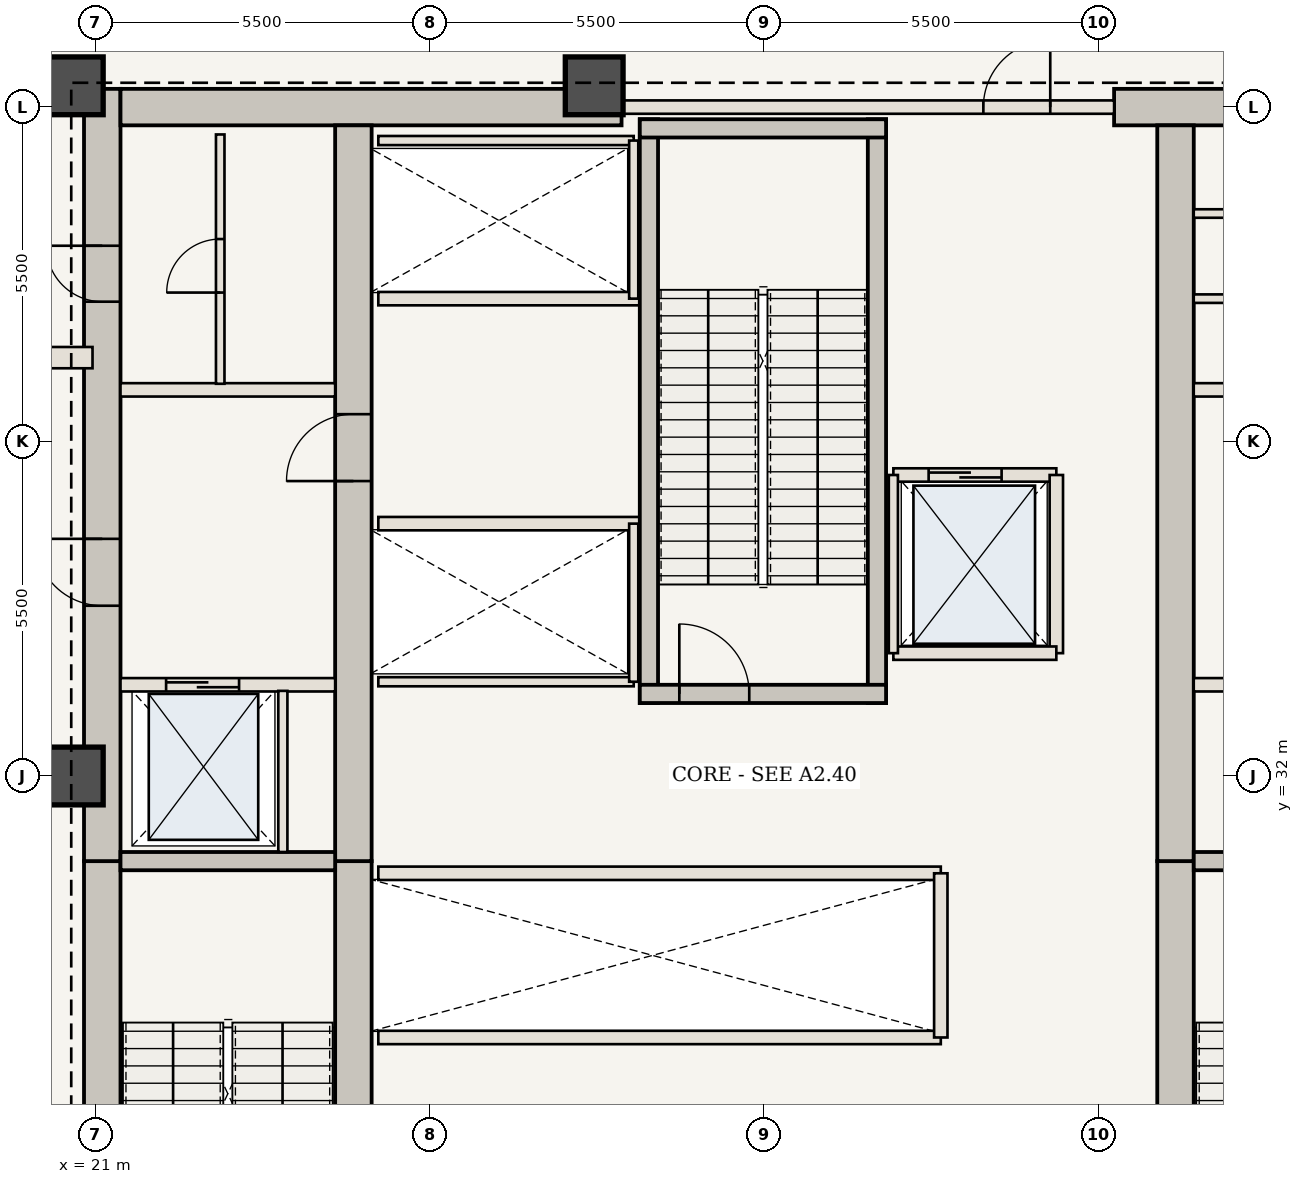
"""IFC4 building model, lengths in metres.
Left out: names, types, materials, properties, quantities, classifications, styles, units other than length and angle.
Written with IfcOpenShell. Run it as: python <this file> out.ifc"""

import sys

from ifc_helpers import new_model, si_unit, direction, frame, frame_2d, origin, origin_2d, place, context, subcontext, project, spatial, rectangle, extrude, element, fill, save


model = new_model("IFC4")
c1 = context("Model", 3, precision=1e-05, world=origin(), true_north=direction((0.0, 1.0)))
c2 = subcontext(c1, "Body", "Model", "MODEL_VIEW")
j1 = project(units=[si_unit("LENGTHUNIT", "METRE"), si_unit("PLANEANGLEUNIT", "RADIAN")], contexts=[c1])
p1 = place(None, origin())
s1 = spatial("IfcSite", under=j1, at=p1, CompositionType="ELEMENT")
p2 = place(p1, origin())
s2 = spatial("IfcBuilding", under=s1, at=p2, CompositionType="ELEMENT")
p3 = place(p2, frame((0.0, 0.0, 176.05)))
s3 = spatial("IfcBuildingStorey", under=s2, at=p3, CompositionType="ELEMENT", Elevation=176.05)
p4 = place(p3, frame((21.11, 20.65, 0.0), z_axis=(0.0, 0.0, 1.0), x_axis=(0.0, 1.0, 0.0)))
e1 = element("IfcWall", 1, at=p4, inside=s3, PredefinedType="SHEAR", context=c2, shape_type="SweptSolid", body=[
    extrude(rectangle(XDim=9.95, YDim=0.6, at=frame_2d((4.975, 0.0))), origin(), (0.0, 0.0, 1.0), 6.3),
])
p5 = place(p4, frame((1.1, 0.0, 0.0)))
e2 = element("IfcOpeningElement", 2, at=p5, cuts=e1, PredefinedType="OPENING", context=c2, shape_type="SweptSolid", body=[
    extrude(rectangle(XDim=1.15, YDim=2.15, at=frame_2d((0.575, 1.075))), frame((0.0, 0.31, 0.0), z_axis=(0.0, -1.0, 0.0), x_axis=(1.0, 0.0, 0.0)), (0.0, 0.0, 1.0), 0.62),
])
p6 = place(p3, frame((21.11, 30.6, 0.0), z_axis=(0.0, 0.0, 1.0), x_axis=(0.0, 1.0, 0.0)))
e3 = element("IfcWall", 3, at=p6, inside=s3, PredefinedType="SHEAR", context=c2, shape_type="SweptSolid", body=[
    extrude(rectangle(XDim=12.7, YDim=0.6, at=frame_2d((6.35, 0.0))), origin(), (0.0, 0.0, 1.0), 6.3),
])
p7 = place(p6, frame((4.2, 0.0, 0.0)))
e4 = element("IfcOpeningElement", 4, at=p7, cuts=e3, PredefinedType="OPENING", context=c2, shape_type="SweptSolid", body=[
    extrude(rectangle(XDim=1.1, YDim=2.15, at=frame_2d((0.55, 1.075))), frame((0.0, 0.31, 0.0), z_axis=(0.0, -1.0, 0.0), x_axis=(1.0, 0.0, 0.0)), (0.0, 0.0, 1.0), 0.62),
])
p8 = place(p6, frame((9.2, 0.0, 0.0)))
e5 = element("IfcOpeningElement", 5, at=p8, cuts=e3, PredefinedType="OPENING", context=c2, shape_type="SweptSolid", body=[
    extrude(rectangle(XDim=0.92, YDim=2.1, at=frame_2d((0.46, 1.05))), frame((0.0, 0.31, 0.0), z_axis=(0.0, -1.0, 0.0), x_axis=(1.0, 0.0, 0.0)), (0.0, 0.0, 1.0), 0.62),
])
p9 = place(p3, frame((21.41, 43.0, 0.0), z_axis=(0.0, 0.0, 1.0), x_axis=(1.0, 0.0, 0.0)))
e6 = element("IfcWall", 6, at=p9, inside=s3, PredefinedType="SHEAR", context=c2, shape_type="SweptSolid", body=[
    extrude(rectangle(XDim=8.24, YDim=0.6, at=frame_2d((4.12, 0.0))), origin(), (0.0, 0.0, 1.0), 6.3),
])
p10 = place(p3, frame((37.75, 43.0, 0.0), z_axis=(0.0, 0.0, 1.0), x_axis=(1.0, 0.0, 0.0)))
e7 = element("IfcWall", 7, at=p10, inside=s3, PredefinedType="SHEAR", context=c2, shape_type="SweptSolid", body=[
    extrude(rectangle(XDim=4.84, YDim=0.6, at=frame_2d((2.42, 0.0))), origin(), (0.0, 0.0, 1.0), 6.3),
])
p11 = place(p3, frame((25.24, 21.25, 0.0), z_axis=(0.0, 0.0, 1.0), x_axis=(0.0, 1.0, 0.0)))
e8 = element("IfcWall", 8, at=p11, inside=s3, PredefinedType="SHEAR", context=c2, shape_type="SweptSolid", body=[
    extrude(rectangle(XDim=9.35, YDim=0.6, at=frame_2d((4.675, 0.0))), origin(), (0.0, 0.0, 1.0), 6.3),
])
p12 = place(p3, frame((25.24, 30.6, 0.0), z_axis=(0.0, 0.0, 1.0), x_axis=(0.0, 1.0, 0.0)))
e9 = element("IfcWall", 9, at=p12, inside=s3, PredefinedType="SHEAR", context=c2, shape_type="SweptSolid", body=[
    extrude(rectangle(XDim=12.1, YDim=0.6, at=frame_2d((6.05, 0.0))), origin(), (0.0, 0.0, 1.0), 6.3),
])
p13 = place(p12, frame((6.25, 0.0, 0.0)))
e10 = element("IfcOpeningElement", 10, at=p13, cuts=e9, PredefinedType="OPENING", context=c2, shape_type="SweptSolid", body=[
    extrude(rectangle(XDim=1.1, YDim=2.15, at=frame_2d((0.55, 1.075))), frame((0.0, 0.31, 0.0), z_axis=(0.0, -1.0, 0.0), x_axis=(1.0, 0.0, 0.0)), (0.0, 0.0, 1.0), 0.62),
])
p14 = place(p3, frame((38.76, 21.25, 0.0), z_axis=(0.0, 0.0, 1.0), x_axis=(0.0, 1.0, 0.0)))
e11 = element("IfcWall", 11, at=p14, inside=s3, PredefinedType="SHEAR", context=c2, shape_type="SweptSolid", body=[
    extrude(rectangle(XDim=9.35, YDim=0.6, at=frame_2d((4.675, 0.0))), origin(), (0.0, 0.0, 1.0), 6.3),
])
p15 = place(p3, frame((38.76, 30.6, 0.0), z_axis=(0.0, 0.0, 1.0), x_axis=(0.0, 1.0, 0.0)))
e12 = element("IfcWall", 12, at=p15, inside=s3, PredefinedType="SHEAR", context=c2, shape_type="SweptSolid", body=[
    extrude(rectangle(XDim=12.1, YDim=0.6, at=frame_2d((6.05, 0.0))), origin(), (0.0, 0.0, 1.0), 6.3),
])
for number, where, z_axis, x_axis in (
    (13, (29.2, 43.35, 0.0), (0.0, 0.0, 1.0), (1.0, 0.0, 0.0)),
    (14, (20.65, 43.35, 0.0), (0.0, 0.0, 1.0), (1.0, 0.0, 0.0)),
    (15, (20.65, 32.0, 0.0), (0.0, 0.0, 1.0), (1.0, 0.0, 0.0)),
):
    element("IfcColumn", number, at=place(p3, frame(where, z_axis=z_axis, x_axis=x_axis)), inside=s3, PredefinedType="COLUMN", context=c2, shape_type="SweptSolid", body=[
        extrude(rectangle(XDim=0.95, YDim=0.95, at=origin_2d()), origin(), (0.0, 0.0, 1.0), 5.88),
    ])
for number, where, z_axis, x_axis in (
    (16, (21.41, 30.6, 0.0), (0.0, 0.0, 1.0), (1.0, 0.0, 0.0)),
    (17, (39.06, 30.6, 0.0), (0.0, 0.0, 1.0), (1.0, 0.0, 0.0)),
):
    element("IfcWall", number, at=place(p3, frame(where, z_axis=z_axis, x_axis=x_axis)), inside=s3, PredefinedType="SHEAR", context=c2, shape_type="SweptSolid", body=[
        extrude(rectangle(XDim=3.53, YDim=0.3, at=frame_2d((1.765, 0.0))), origin(), (0.0, 0.0, 1.0), 5.88),
    ])
p16 = place(p3, frame((21.41, 33.5, 0.0), z_axis=(0.0, 0.0, 1.0), x_axis=(1.0, 0.0, 0.0)))
e18 = element("IfcWall", 18, at=p16, inside=s3, PredefinedType="STANDARD", context=c2, shape_type="SweptSolid", body=[
    extrude(rectangle(XDim=3.53, YDim=0.22, at=frame_2d((1.765, 0.0))), origin(), (0.0, 0.0, 1.0), 5.88),
])
p17 = place(p16, frame((0.75, 0.0, 0.0)))
e19 = element("IfcOpeningElement", 19, at=p17, cuts=e18, PredefinedType="OPENING", context=c2, shape_type="SweptSolid", body=[
    extrude(rectangle(XDim=1.2, YDim=2.2, at=frame_2d((0.6, 1.1))), frame((0.0, 0.12, 0.0), z_axis=(0.0, -1.0, 0.0), x_axis=(1.0, 0.0, 0.0)), (0.0, 0.0, 1.0), 0.24),
])
p18 = place(p3, frame((24.08, 30.75, 0.0), z_axis=(0.0, 0.0, 1.0), x_axis=(0.0, 1.0, 0.0)))
e20 = element("IfcWall", 20, at=p18, inside=s3, PredefinedType="STANDARD", context=c2, shape_type="SweptSolid", body=[
    extrude(rectangle(XDim=2.65, YDim=0.15, at=frame_2d((1.325, 0.0))), origin(), (0.0, 0.0, 1.0), 5.88),
])
p19 = place(p3, frame((39.06, 33.5, 0.0), z_axis=(0.0, 0.0, 1.0), x_axis=(1.0, 0.0, 0.0)))
e21 = element("IfcWall", 21, at=p19, inside=s3, PredefinedType="STANDARD", context=c2, shape_type="SweptSolid", body=[
    extrude(rectangle(XDim=3.53, YDim=0.22, at=frame_2d((1.765, 0.0))), origin(), (0.0, 0.0, 1.0), 5.88),
])
p20 = place(p19, frame((1.55, 0.0, 0.0)))
e22 = element("IfcOpeningElement", 22, at=p20, cuts=e21, PredefinedType="OPENING", context=c2, shape_type="SweptSolid", body=[
    extrude(rectangle(XDim=1.2, YDim=2.2, at=frame_2d((0.6, 1.1))), frame((0.0, 0.12, 0.0), z_axis=(0.0, -1.0, 0.0), x_axis=(1.0, 0.0, 0.0)), (0.0, 0.0, 1.0), 0.24),
])
for number, where, z_axis, x_axis in (
    (23, (21.41, 38.35, 0.0), (0.0, 0.0, 1.0), (1.0, 0.0, 0.0)),
    (24, (39.06, 38.35, 0.0), (0.0, 0.0, 1.0), (1.0, 0.0, 0.0)),
):
    element("IfcWall", number, at=place(p3, frame(where, z_axis=z_axis, x_axis=x_axis)), inside=s3, PredefinedType="STANDARD", context=c2, shape_type="SweptSolid", body=[
        extrude(rectangle(XDim=3.53, YDim=0.22, at=frame_2d((1.765, 0.0))), origin(), (0.0, 0.0, 1.0), 5.88),
    ])
p21 = place(p3, frame((23.05, 38.45, 0.0), z_axis=(0.0, 0.0, 1.0), x_axis=(0.0, 1.0, 0.0)))
e25 = element("IfcWall", 25, at=p21, inside=s3, PredefinedType="STANDARD", context=c2, shape_type="SweptSolid", body=[
    extrude(rectangle(XDim=4.1, YDim=0.14, at=frame_2d((2.05, 0.0))), origin(), (0.0, 0.0, 1.0), 5.88),
])
p22 = place(p21, frame((1.5, 0.0, 0.0)))
e26 = element("IfcOpeningElement", 26, at=p22, cuts=e25, PredefinedType="OPENING", context=c2, shape_type="SweptSolid", body=[
    extrude(rectangle(XDim=0.88, YDim=2.1, at=frame_2d((0.44, 1.05))), frame((0.0, 0.08, 0.0), z_axis=(0.0, -1.0, 0.0), x_axis=(1.0, 0.0, 0.0)), (0.0, 0.0, 1.0), 0.16),
])
for number, where, z_axis, x_axis in (
    (27, (39.06, 39.85, 0.0), (0.0, 0.0, 1.0), (1.0, 0.0, 0.0)),
    (28, (39.06, 41.25, 0.0), (0.0, 0.0, 1.0), (1.0, 0.0, 0.0)),
):
    element("IfcWall", number, at=place(p3, frame(where, z_axis=z_axis, x_axis=x_axis)), inside=s3, PredefinedType="STANDARD", context=c2, shape_type="SweptSolid", body=[
        extrude(rectangle(XDim=3.53, YDim=0.14, at=frame_2d((1.765, 0.0))), origin(), (0.0, 0.0, 1.0), 5.88),
    ])
for number, where, z_axis, x_axis in (
    (29, (25.65, 27.7, 0.0), (0.0, 0.0, 1.0), (1.0, 0.0, 0.0)),
    (30, (25.65, 30.4, 0.0), (0.0, 0.0, 1.0), (1.0, 0.0, 0.0)),
):
    element("IfcWall", number, at=place(p3, frame(where, z_axis=z_axis, x_axis=x_axis)), inside=s3, PredefinedType="STANDARD", context=c2, shape_type="SweptSolid", body=[
        extrude(rectangle(XDim=9.25, YDim=0.22, at=frame_2d((4.625, 0.0))), origin(), (0.0, 0.0, 1.0), 5.88),
    ])
p23 = place(p3, frame((34.9, 27.7, 0.0), z_axis=(0.0, 0.0, 1.0), x_axis=(0.0, 1.0, 0.0)))
e31 = element("IfcWall", 31, at=p23, inside=s3, PredefinedType="STANDARD", context=c2, shape_type="SweptSolid", body=[
    extrude(rectangle(XDim=2.7, YDim=0.22, at=frame_2d((1.35, 0.0))), origin(), (0.0, 0.0, 1.0), 5.88),
])
p24 = place(p3, frame((25.65, 36.15, 0.0), z_axis=(0.0, 0.0, 1.0), x_axis=(1.0, 0.0, 0.0)))
e32 = element("IfcWall", 32, at=p24, inside=s3, PredefinedType="STANDARD", context=c2, shape_type="SweptSolid", body=[
    extrude(rectangle(XDim=4.3, YDim=0.22, at=frame_2d((2.15, 0.0))), origin(), (0.0, 0.0, 1.0), 5.88),
])
p25 = place(p3, frame((25.65, 33.55, 0.0), z_axis=(0.0, 0.0, 1.0), x_axis=(1.0, 0.0, 0.0)))
e33 = element("IfcWall", 33, at=p25, inside=s3, PredefinedType="STANDARD", context=c2, shape_type="SweptSolid", body=[
    extrude(rectangle(XDim=4.2, YDim=0.15, at=frame_2d((2.1, 0.0))), origin(), (0.0, 0.0, 1.0), 5.88),
])
p26 = place(p3, frame((29.85, 33.55, 0.0), z_axis=(0.0, 0.0, 1.0), x_axis=(0.0, 1.0, 0.0)))
e34 = element("IfcWall", 34, at=p26, inside=s3, PredefinedType="STANDARD", context=c2, shape_type="SweptSolid", body=[
    extrude(rectangle(XDim=2.6, YDim=0.15, at=frame_2d((1.3, 0.0))), origin(), (0.0, 0.0, 1.0), 5.88),
])
p27 = place(p3, frame((25.65, 39.85, 0.0), z_axis=(0.0, 0.0, 1.0), x_axis=(1.0, 0.0, 0.0)))
e35 = element("IfcWall", 35, at=p27, inside=s3, PredefinedType="STANDARD", context=c2, shape_type="SweptSolid", body=[
    extrude(rectangle(XDim=4.3, YDim=0.22, at=frame_2d((2.15, 0.0))), origin(), (0.0, 0.0, 1.0), 5.88),
])
p28 = place(p3, frame((25.65, 42.45, 0.0), z_axis=(0.0, 0.0, 1.0), x_axis=(1.0, 0.0, 0.0)))
e36 = element("IfcWall", 36, at=p28, inside=s3, PredefinedType="STANDARD", context=c2, shape_type="SweptSolid", body=[
    extrude(rectangle(XDim=4.2, YDim=0.15, at=frame_2d((2.1, 0.0))), origin(), (0.0, 0.0, 1.0), 5.88),
])
p29 = place(p3, frame((29.85, 39.85, 0.0), z_axis=(0.0, 0.0, 1.0), x_axis=(0.0, 1.0, 0.0)))
e37 = element("IfcWall", 37, at=p29, inside=s3, PredefinedType="STANDARD", context=c2, shape_type="SweptSolid", body=[
    extrude(rectangle(XDim=2.6, YDim=0.15, at=frame_2d((1.3, 0.0))), origin(), (0.0, 0.0, 1.0), 5.88),
])
for number, where, z_axis, x_axis in (
    (38, (30.1, 33.2, 0.0), (0.0, 0.0, 1.0), (0.0, 1.0, 0.0)),
    (39, (33.85, 33.2, 0.0), (0.0, 0.0, 1.0), (0.0, 1.0, 0.0)),
):
    element("IfcWall", number, at=place(p3, frame(where, z_axis=z_axis, x_axis=x_axis)), inside=s3, PredefinedType="SHEAR", context=c2, shape_type="SweptSolid", body=[
        extrude(rectangle(XDim=9.6, YDim=0.3, at=frame_2d((4.8, 0.0))), origin(), (0.0, 0.0, 1.0), 5.88),
    ])
p30 = place(p3, frame((29.95, 33.35, 0.0), z_axis=(0.0, 0.0, 1.0), x_axis=(1.0, 0.0, 0.0)))
e40 = element("IfcWall", 40, at=p30, inside=s3, PredefinedType="SHEAR", context=c2, shape_type="SweptSolid", body=[
    extrude(rectangle(XDim=4.05, YDim=0.3, at=frame_2d((2.025, 0.0))), origin(), (0.0, 0.0, 1.0), 5.88),
])
p31 = place(p30, frame((0.65, 0.0, 0.0)))
e41 = element("IfcOpeningElement", 41, at=p31, cuts=e40, PredefinedType="OPENING", context=c2, shape_type="SweptSolid", body=[
    extrude(rectangle(XDim=1.15, YDim=2.15, at=frame_2d((0.575, 1.075))), frame((0.0, 0.16, 0.0), z_axis=(0.0, -1.0, 0.0), x_axis=(1.0, 0.0, 0.0)), (0.0, 0.0, 1.0), 0.32),
])
p32 = place(p3, frame((29.95, 42.65, 0.0), z_axis=(0.0, 0.0, 1.0), x_axis=(1.0, 0.0, 0.0)))
e42 = element("IfcWall", 42, at=p32, inside=s3, PredefinedType="SHEAR", context=c2, shape_type="SweptSolid", body=[
    extrude(rectangle(XDim=4.05, YDim=0.3, at=frame_2d((2.025, 0.0))), origin(), (0.0, 0.0, 1.0), 5.88),
])
p33 = place(p3, frame((29.65, 43.0, 0.0), z_axis=(0.0, 0.0, 1.0), x_axis=(1.0, 0.0, 0.0)))
e43 = element("IfcWall", 43, at=p33, inside=s3, PredefinedType="STANDARD", context=c2, shape_type="SweptSolid", body=[
    extrude(rectangle(XDim=8.1, YDim=0.22, at=frame_2d((4.05, 0.0))), origin(), (0.0, 0.0, 1.0), 5.88),
])
p34 = place(p33, frame((5.95, 0.0, 0.0)))
e44 = element("IfcOpeningElement", 44, at=p34, cuts=e43, PredefinedType="OPENING", context=c2, shape_type="SweptSolid", body=[
    extrude(rectangle(XDim=1.1, YDim=2.15, at=frame_2d((0.55, 1.075))), frame((0.0, 0.12, 0.0), z_axis=(0.0, -1.0, 0.0), x_axis=(1.0, 0.0, 0.0)), (0.0, 0.0, 1.0), 0.24),
])
p35 = place(p3, frame((34.12, 36.95, 0.0), z_axis=(0.0, 0.0, 1.0), x_axis=(1.0, 0.0, 0.0)))
e45 = element("IfcWall", 45, at=p35, inside=s3, PredefinedType="STANDARD", context=c2, shape_type="SweptSolid", body=[
    extrude(rectangle(XDim=2.68, YDim=0.22, at=frame_2d((1.34, 0.0))), origin(), (0.0, 0.0, 1.0), 5.88),
])
p36 = place(p35, frame((0.58, 0.0, 0.0)))
e46 = element("IfcOpeningElement", 46, at=p36, cuts=e45, PredefinedType="OPENING", context=c2, shape_type="SweptSolid", body=[
    extrude(rectangle(XDim=1.2, YDim=2.2, at=frame_2d((0.6, 1.1))), frame((0.0, 0.12, 0.0), z_axis=(0.0, -1.0, 0.0), x_axis=(1.0, 0.0, 0.0)), (0.0, 0.0, 1.0), 0.24),
])
p37 = place(p3, frame((36.8, 34.02, 0.0), z_axis=(0.0, 0.0, 1.0), x_axis=(0.0, 1.0, 0.0)))
e47 = element("IfcWall", 47, at=p37, inside=s3, PredefinedType="STANDARD", context=c2, shape_type="SweptSolid", body=[
    extrude(rectangle(XDim=2.93, YDim=0.22, at=frame_2d((1.465, 0.0))), origin(), (0.0, 0.0, 1.0), 5.88),
])
p38 = place(p3, frame((34.12, 34.02, 0.0), z_axis=(0.0, 0.0, 1.0), x_axis=(1.0, 0.0, 0.0)))
e48 = element("IfcWall", 48, at=p38, inside=s3, PredefinedType="STANDARD", context=c2, shape_type="SweptSolid", body=[
    extrude(rectangle(XDim=2.68, YDim=0.22, at=frame_2d((1.34, 0.0))), origin(), (0.0, 0.0, 1.0), 5.88),
])
p39 = place(p3, frame((34.12, 34.02, 0.0), z_axis=(0.0, 0.0, 1.0), x_axis=(0.0, 1.0, 0.0)))
e49 = element("IfcWall", 49, at=p39, inside=s3, PredefinedType="STANDARD", context=c2, shape_type="SweptSolid", body=[
    extrude(rectangle(XDim=2.93, YDim=0.15, at=frame_2d((1.465, 0.0))), origin(), (0.0, 0.0, 1.0), 5.88),
])
p40 = place(p3, frame((18.4, 38.88, 0.0), z_axis=(0.0, 0.0, 1.0), x_axis=(1.0, 0.0, 0.0)))
e50 = element("IfcWall", 50, at=p40, inside=s3, PredefinedType="STANDARD", context=c2, shape_type="SweptSolid", body=[
    extrude(rectangle(XDim=2.55, YDim=0.35, at=frame_2d((1.275, 0.0))), origin(), (0.0, 0.0, 1.0), 5.88),
])
p41 = place(p40, frame((0.65, 0.0, 0.0)))
e51 = element("IfcOpeningElement", 51, at=p41, cuts=e50, PredefinedType="OPENING", context=c2, shape_type="SweptSolid", body=[
    extrude(rectangle(XDim=1.1, YDim=2.15, at=frame_2d((0.55, 1.075))), frame((0.0, 0.185, 0.0), z_axis=(0.0, -1.0, 0.0), x_axis=(1.0, 0.0, 0.0)), (0.0, 0.0, 1.0), 0.37),
])
p42 = place(p7, origin())
e52 = element("IfcDoor", 52, at=p42, inside=s3, OperationType="SINGLE_SWING_RIGHT", PredefinedType="DOOR", context=c2, shape_type="SweptSolid", body=[
    extrude(rectangle(XDim=1.1, YDim=2.15, at=frame_2d((0.55, 1.075))), frame((0.0, 0.025, 0.0), z_axis=(0.0, -1.0, 0.0), x_axis=(1.0, 0.0, 0.0)), (0.0, 0.0, 1.0), 0.05),
])
fill(e4, e52)
p43 = place(p13, origin())
e53 = element("IfcDoor", 53, at=p43, inside=s3, OperationType="SINGLE_SWING_LEFT", PredefinedType="DOOR", context=c2, shape_type="SweptSolid", body=[
    extrude(rectangle(XDim=1.1, YDim=2.15, at=frame_2d((0.55, 1.075))), frame((0.0, 0.025, 0.0), z_axis=(0.0, -1.0, 0.0), x_axis=(1.0, 0.0, 0.0)), (0.0, 0.0, 1.0), 0.05),
])
fill(e10, e53)
p44 = place(p8, origin())
e54 = element("IfcDoor", 54, at=p44, inside=s3, OperationType="SINGLE_SWING_RIGHT", PredefinedType="DOOR", context=c2, shape_type="SweptSolid", body=[
    extrude(rectangle(XDim=0.92, YDim=2.1, at=frame_2d((0.46, 1.05))), frame((0.0, 0.025, 0.0), z_axis=(0.0, -1.0, 0.0), x_axis=(1.0, 0.0, 0.0)), (0.0, 0.0, 1.0), 0.05),
])
fill(e5, e54)
p45 = place(p17, origin())
e55 = element("IfcDoor", 55, at=p45, inside=s3, OperationType="DOUBLE_DOOR_SLIDING", PredefinedType="DOOR", context=c2, shape_type="SweptSolid", body=[
    extrude(rectangle(XDim=1.2, YDim=2.2, at=frame_2d((0.6, 1.1))), frame((0.0, 0.025, 0.0), z_axis=(0.0, -1.0, 0.0), x_axis=(1.0, 0.0, 0.0)), (0.0, 0.0, 1.0), 0.05),
])
fill(e19, e55)
p46 = place(p22, origin())
e56 = element("IfcDoor", 56, at=p46, inside=s3, OperationType="SINGLE_SWING_LEFT", PredefinedType="DOOR", context=c2, shape_type="SweptSolid", body=[
    extrude(rectangle(XDim=0.88, YDim=2.1, at=frame_2d((0.44, 1.05))), frame((0.0, 0.025, 0.0), z_axis=(0.0, -1.0, 0.0), x_axis=(1.0, 0.0, 0.0)), (0.0, 0.0, 1.0), 0.05),
])
fill(e26, e56)
p47 = place(p31, origin())
e57 = element("IfcDoor", 57, at=p47, inside=s3, OperationType="SINGLE_SWING_LEFT", PredefinedType="DOOR", context=c2, shape_type="SweptSolid", body=[
    extrude(rectangle(XDim=1.15, YDim=2.15, at=frame_2d((0.575, 1.075))), frame((0.0, 0.025, 0.0), z_axis=(0.0, -1.0, 0.0), x_axis=(1.0, 0.0, 0.0)), (0.0, 0.0, 1.0), 0.05),
])
fill(e41, e57)
p48 = place(p34, origin())
e58 = element("IfcDoor", 58, at=p48, inside=s3, OperationType="SINGLE_SWING_RIGHT", PredefinedType="DOOR", context=c2, shape_type="SweptSolid", body=[
    extrude(rectangle(XDim=1.1, YDim=2.15, at=frame_2d((0.55, 1.075))), frame((0.0, 0.025, 0.0), z_axis=(0.0, -1.0, 0.0), x_axis=(1.0, 0.0, 0.0)), (0.0, 0.0, 1.0), 0.05),
])
fill(e44, e58)
p49 = place(p36, origin())
e59 = element("IfcDoor", 59, at=p49, inside=s3, OperationType="DOUBLE_DOOR_SLIDING", PredefinedType="DOOR", context=c2, shape_type="SweptSolid", body=[
    extrude(rectangle(XDim=1.2, YDim=2.2, at=frame_2d((0.6, 1.1))), frame((0.0, 0.025, 0.0), z_axis=(0.0, -1.0, 0.0), x_axis=(1.0, 0.0, 0.0)), (0.0, 0.0, 1.0), 0.05),
])
fill(e46, e59)
save(model, sys.argv[1])
